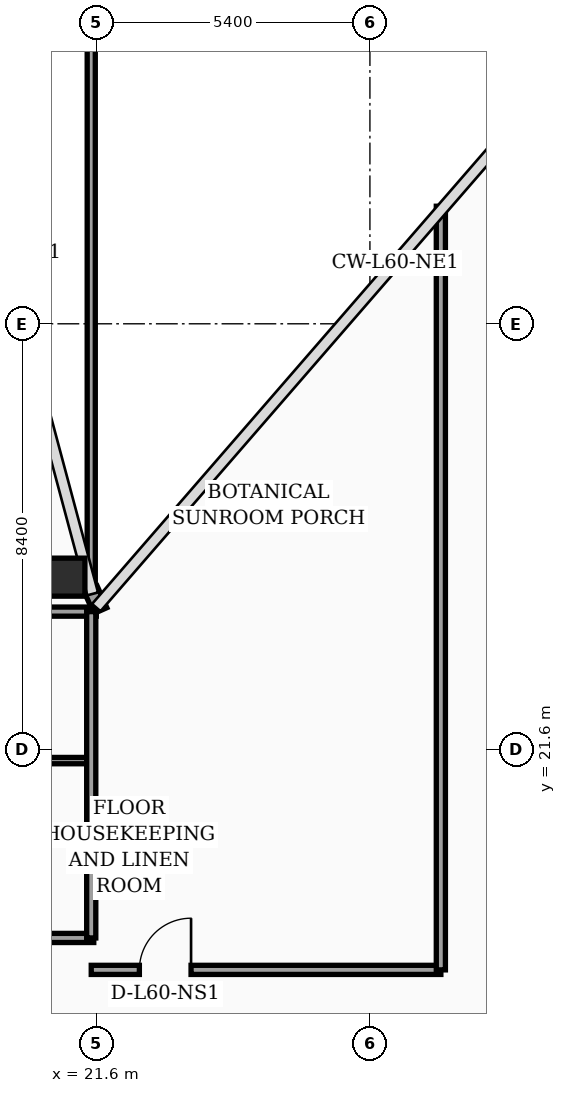
"""IFC4 building model, lengths in metres.
Left out: names, types, materials, properties, quantities, classifications, styles, units other than length and angle.
Written with IfcOpenShell. Run it as: python <this file> out.ifc"""

import sys

from ifc_helpers import new_model, si_unit, direction, frame, frame_2d, origin, origin_2d, place, context, subcontext, project, spatial, rectangle, hollow_rectangle, extrude, element, fill, save


model = new_model("IFC4")
c1 = context("Model", 3, precision=1e-05, world=origin(), true_north=direction((0.0, 1.0)))
c2 = subcontext(c1, "Body", "Model", "MODEL_VIEW")
j1 = project(units=[si_unit("LENGTHUNIT", "METRE"), si_unit("PLANEANGLEUNIT", "RADIAN")], contexts=[c1])
p1 = place(None, origin())
s1 = spatial("IfcSite", under=j1, at=p1, CompositionType="ELEMENT")
p2 = place(p1, origin())
s2 = spatial("IfcBuilding", under=s1, at=p2, CompositionType="ELEMENT")
p3 = place(p2, frame((0.0, 0.0, 243.8)))
s3 = spatial("IfcBuildingStorey", under=s2, at=p3, CompositionType="ELEMENT", Elevation=243.8)
p4 = place(p3, frame((21.0, 25.0, 0.0), z_axis=(0.0, 0.0, 1.0), x_axis=(1.0, 0.0, 0.0)))
e1 = element("IfcColumn", 1, at=p4, inside=s3, PredefinedType="COLUMN", context=c2, shape_type="SweptSolid", body=[
    extrude(hollow_rectangle(XDim=0.75, YDim=0.75, WallThickness=0.032, at=origin_2d()), origin(), (0.0, 0.0, 1.0), 3.56),
])
p5 = place(p3, frame((21.68, 24.34, 0.0), z_axis=(0.0, 0.0, 1.0), x_axis=(-0.40758134973, 0.913168901875, 0.0)))
e2 = element("IfcWall", 2, at=p5, inside=s3, PredefinedType="SOLIDWALL", context=c2, shape_type="SweptSolid", body=[
    extrude(rectangle(XDim=0.471, YDim=0.28, at=frame_2d((0.235, 0.0))), origin(), (0.0, 0.0, 1.0), 3.56),
])
p6 = place(p3, frame((17.65, 17.88, 0.0), z_axis=(0.0, 0.0, 1.0), x_axis=(1.0, 0.0, 0.0)))
e3 = element("IfcWall", 3, at=p6, inside=s3, PredefinedType="PARTITIONING", context=c2, shape_type="SweptSolid", body=[
    extrude(rectangle(XDim=3.9, YDim=0.18, at=frame_2d((1.95, 0.0))), origin(), (0.0, 0.0, 1.0), 3.09),
])
p7 = place(p3, frame((17.65, 21.38, 0.0), z_axis=(0.0, 0.0, 1.0), x_axis=(1.0, 0.0, 0.0)))
e4 = element("IfcWall", 4, at=p7, inside=s3, PredefinedType="PARTITIONING", context=c2, shape_type="SweptSolid", body=[
    extrude(rectangle(XDim=3.9, YDim=0.125, at=frame_2d((1.95, 0.0))), origin(), (0.0, 0.0, 1.0), 3.56),
])
p8 = place(p3, frame((17.65, 24.32, 0.0), z_axis=(0.0, 0.0, 1.0), x_axis=(1.0, 0.0, 0.0)))
e5 = element("IfcWall", 5, at=p8, inside=s3, PredefinedType="PARTITIONING", context=c2, shape_type="SweptSolid", body=[
    extrude(rectangle(XDim=3.95, YDim=0.18, at=frame_2d((1.975, 0.0))), origin(), (0.0, 0.0, 1.0), 3.56),
])
p9 = place(p3, frame((21.5, 17.88, 0.0), z_axis=(0.0, 0.0, 1.0), x_axis=(0.0, 1.0, 0.0)))
e6 = element("IfcWall", 6, at=p9, inside=s3, PredefinedType="PARTITIONING", context=c2, shape_type="SweptSolid", body=[
    extrude(rectangle(XDim=6.44, YDim=0.18, at=frame_2d((3.22, 0.0))), origin(), (0.0, 0.0, 1.0), 3.09),
])
p10 = place(p3, frame((21.5, 24.85, 0.0), z_axis=(0.0, 0.0, 1.0), x_axis=(0.0, 1.0, 0.0)))
e7 = element("IfcWall", 7, at=p10, inside=s3, PredefinedType="PARTITIONING", context=c2, shape_type="SweptSolid", body=[
    extrude(rectangle(XDim=13.05, YDim=0.16, at=frame_2d((6.525, 0.0))), origin(), (0.0, 0.0, 1.0), 2.99),
])
p11 = place(p3, frame((21.5, 17.25, 0.0), z_axis=(0.0, 0.0, 1.0), x_axis=(1.0, 0.0, 0.0)))
e8 = element("IfcWall", 8, at=p11, inside=s3, PredefinedType="PARTITIONING", context=c2, shape_type="SweptSolid", body=[
    extrude(rectangle(XDim=6.9, YDim=0.18, at=frame_2d((3.45, 0.0))), origin(), (0.0, 0.0, 1.0), 2.99),
])
p12 = place(p11, frame((0.95, 0.0, 0.0)))
e9 = element("IfcOpeningElement", 9, at=p12, cuts=e8, PredefinedType="OPENING", context=c2, shape_type="SweptSolid", body=[
    extrude(rectangle(XDim=1.02, YDim=2.2, at=frame_2d((0.51, 1.1))), frame((0.0, 0.1, 0.0), z_axis=(0.0, -1.0, 0.0), x_axis=(1.0, 0.0, 0.0)), (0.0, 0.0, 1.0), 0.2),
])
p13 = place(p3, frame((28.4, 17.25, 0.0), z_axis=(0.0, 0.0, 1.0), x_axis=(0.0, 1.0, 0.0)))
e10 = element("IfcWall", 10, at=p13, inside=s3, PredefinedType="PARTITIONING", context=c2, shape_type="SweptSolid", body=[
    extrude(rectangle(XDim=15.07, YDim=0.18, at=frame_2d((7.535, 0.0))), origin(), (0.0, 0.0, 1.0), 2.99),
])
p14 = place(p12, origin())
e11 = element("IfcDoor", 11, at=p14, inside=s3, OperationType="SINGLE_SWING_RIGHT", PredefinedType="DOOR", context=c2, shape_type="SweptSolid", body=[
    extrude(rectangle(XDim=1.02, YDim=2.2, at=frame_2d((0.51, 1.1))), frame((0.0, 0.025, 0.0), z_axis=(0.0, -1.0, 0.0), x_axis=(1.0, 0.0, 0.0)), (0.0, 0.0, 1.0), 0.05),
])
fill(e9, e11)
save(model, sys.argv[1])
